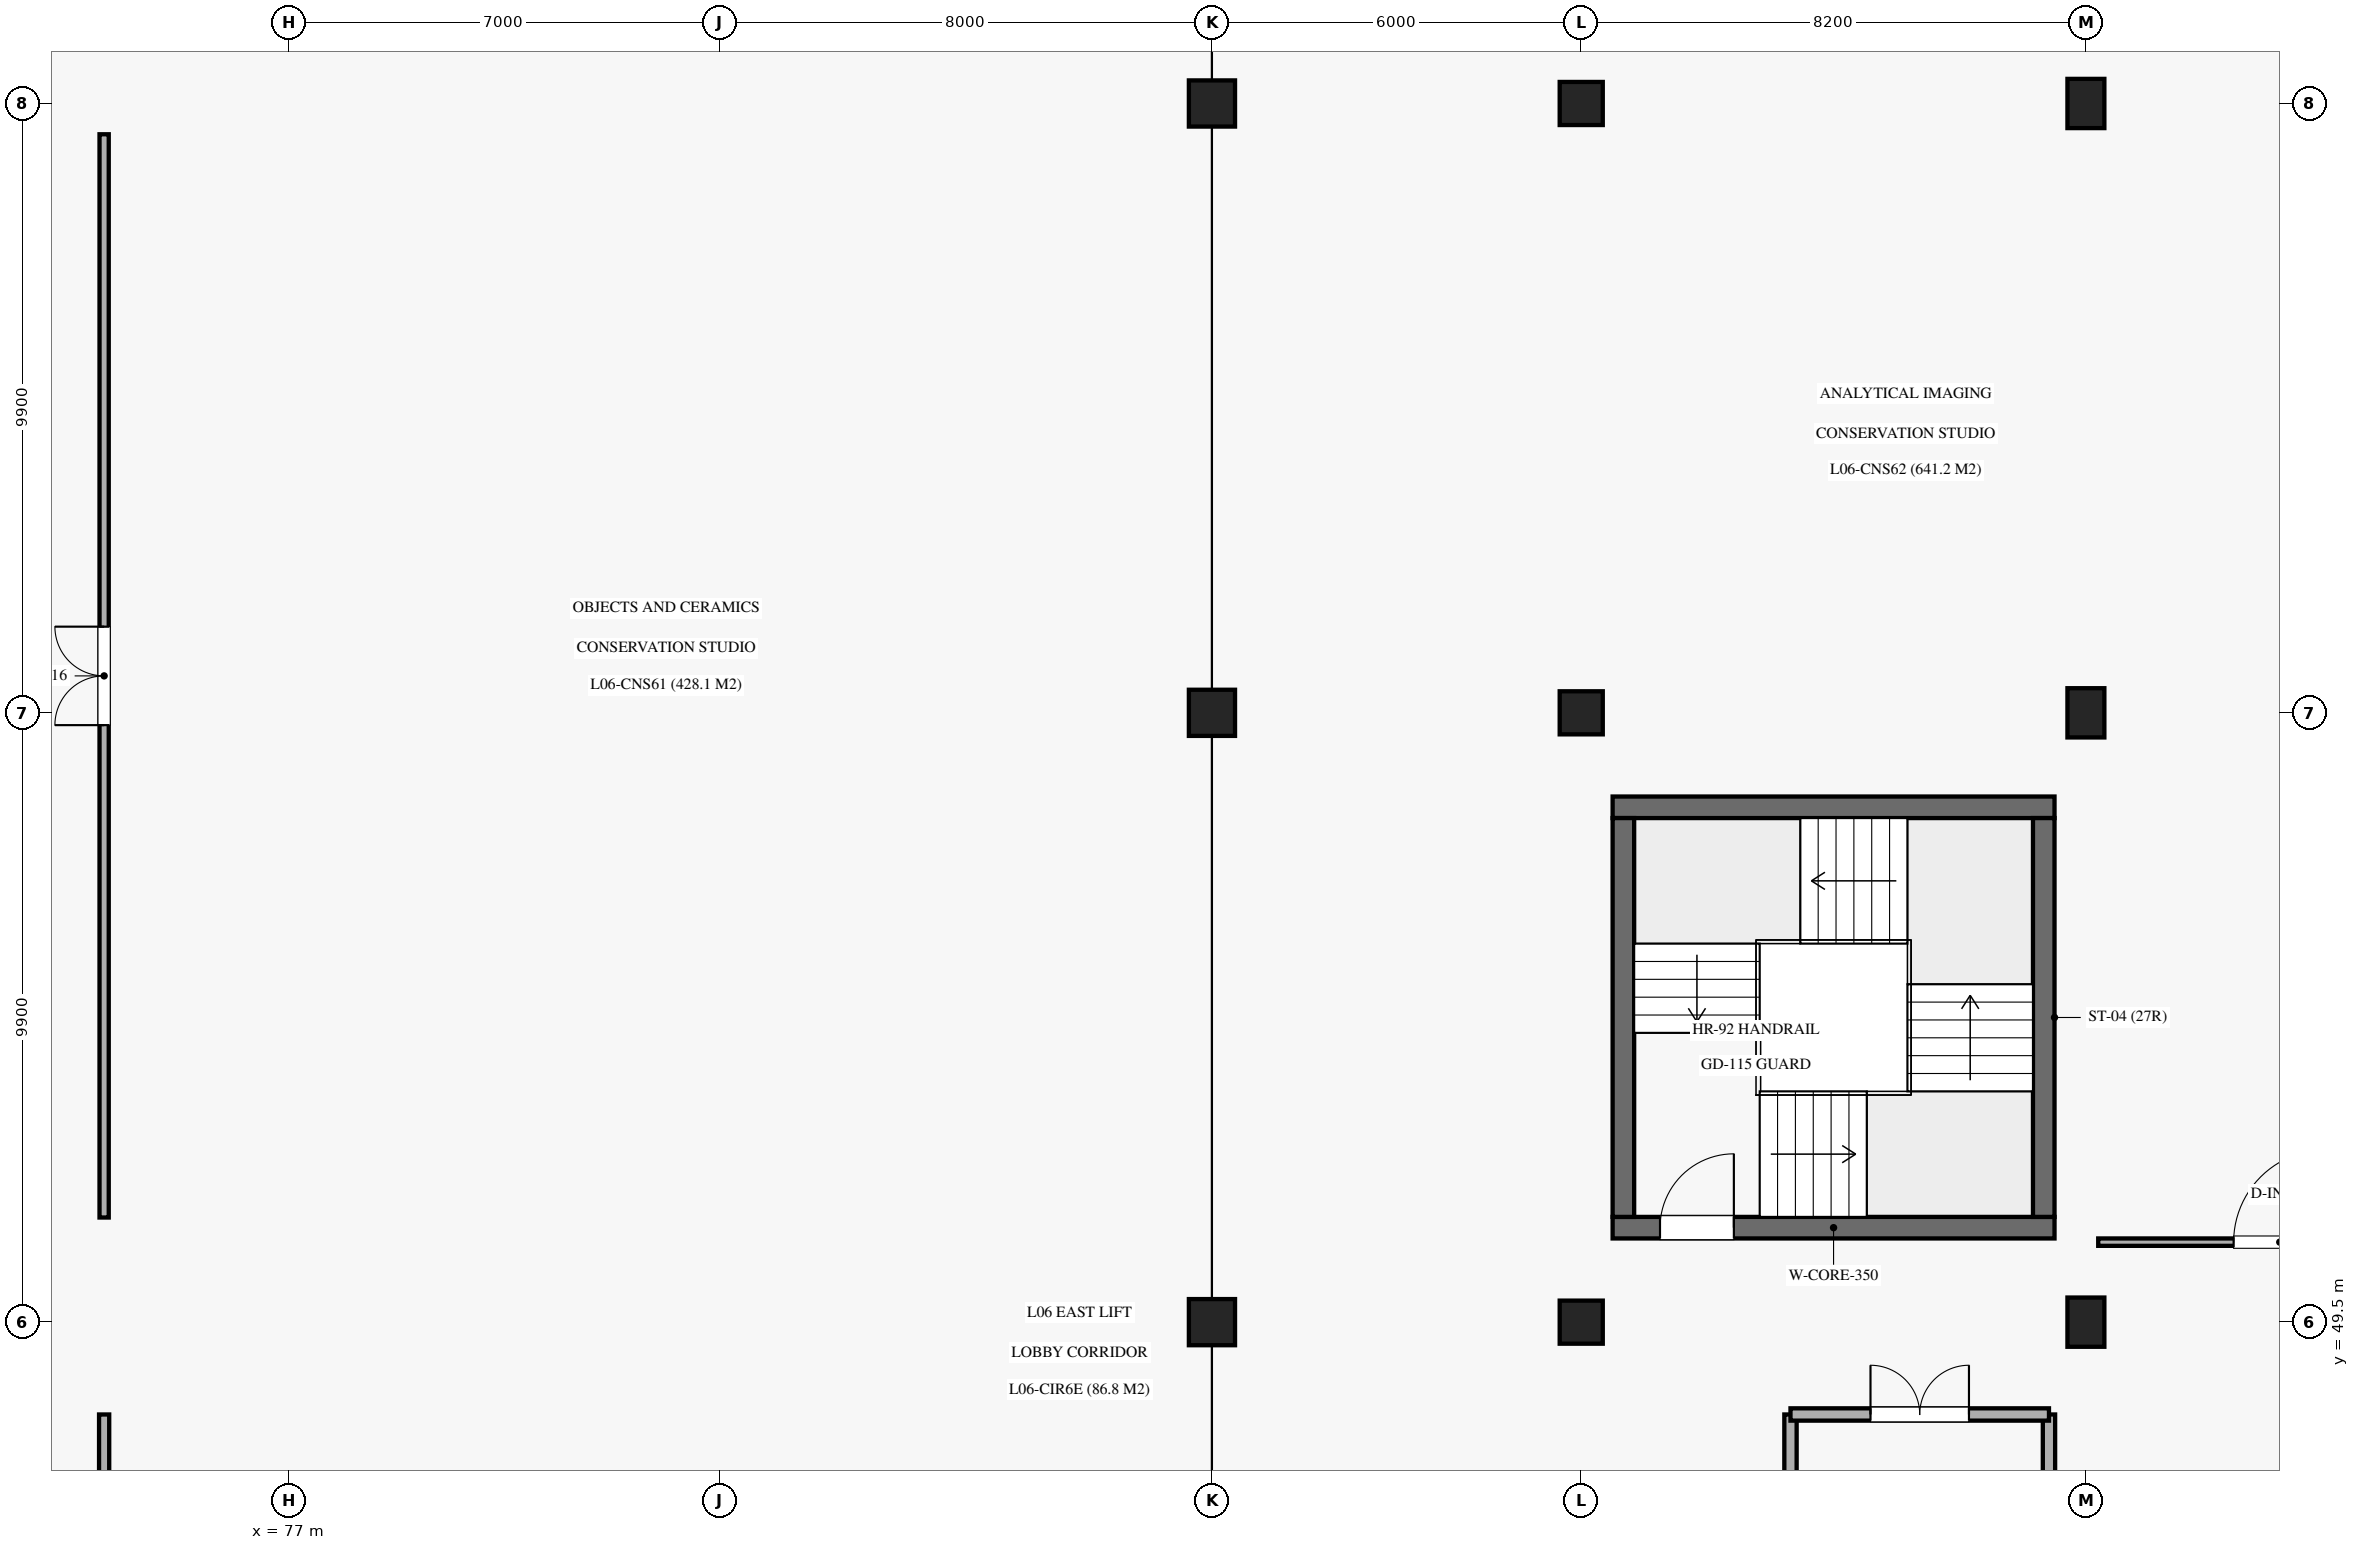
"""IFC4 building model, lengths in metres.
Left out: names, types, materials, properties, quantities, classifications, styles, units other than length and angle.
Written with IfcOpenShell. Run it as: python <this file> out.ifc"""

import sys

from ifc_helpers import new_model, si_unit, direction, frame, frame_2d, origin, origin_2d, place, context, subcontext, project, spatial, rectangle, extrude, element, fill, save


model = new_model("IFC4")
c1 = context("Model", 3, precision=1e-05, world=origin(), true_north=direction((0.0, 1.0)))
c2 = subcontext(c1, "Body", "Model", "MODEL_VIEW")
j1 = project(units=[si_unit("LENGTHUNIT", "METRE"), si_unit("PLANEANGLEUNIT", "RADIAN")], contexts=[c1])
p1 = place(None, origin())
s1 = spatial("IfcSite", under=j1, at=p1, CompositionType="ELEMENT")
p2 = place(p1, origin())
s2 = spatial("IfcBuilding", under=s1, at=p2, CompositionType="ELEMENT")
p3 = place(p2, frame((0.0, 0.0, 33.15)))
s3 = spatial("IfcBuildingStorey", under=s2, at=p3, CompositionType="ELEMENT", Elevation=33.15)
for number, where, z_axis, x_axis in (
    (1, (92.0, 49.5, 0.0), (0.0, 0.0, 1.0), (1.0, 0.0, 0.0)),
    (2, (92.0, 59.4, 0.0), (0.0, 0.0, 1.0), (1.0, 0.0, 0.0)),
    (3, (92.0, 69.3, 0.0), (0.0, 0.0, 1.0), (1.0, 0.0, 0.0)),
):
    element("IfcColumn", number, at=place(p3, frame(where, z_axis=z_axis, x_axis=x_axis)), inside=s3, PredefinedType="COLUMN", context=c2, shape_type="SweptSolid", body=[
        extrude(rectangle(XDim=0.75, YDim=0.75, at=origin_2d()), origin(), (0.0, 0.0, 1.0), 4.59),
    ])
for number, where, z_axis, x_axis in (
    (4, (98.0, 49.5, 0.0), (0.0, 0.0, 1.0), (1.0, 0.0, 0.0)),
    (5, (98.0, 59.4, 0.0), (0.0, 0.0, 1.0), (1.0, 0.0, 0.0)),
    (6, (98.0, 69.3, 0.0), (0.0, 0.0, 1.0), (1.0, 0.0, 0.0)),
):
    element("IfcColumn", number, at=place(p3, frame(where, z_axis=z_axis, x_axis=x_axis)), inside=s3, PredefinedType="COLUMN", context=c2, shape_type="SweptSolid", body=[
        extrude(rectangle(XDim=0.7, YDim=0.7, at=origin_2d()), origin(), (0.0, 0.0, 1.0), 4.59),
    ])
for number, where, z_axis, x_axis in (
    (7, (106.2, 49.5, 0.0), (0.0, 0.0, 1.0), (1.0, 0.0, 0.0)),
    (8, (106.2, 59.4, 0.0), (0.0, 0.0, 1.0), (1.0, 0.0, 0.0)),
    (9, (106.2, 69.3, 0.0), (0.0, 0.0, 1.0), (1.0, 0.0, 0.0)),
):
    element("IfcColumn", number, at=place(p3, frame(where, z_axis=z_axis, x_axis=x_axis)), inside=s3, PredefinedType="COLUMN", context=c2, shape_type="SweptSolid", body=[
        extrude(rectangle(XDim=0.6, YDim=0.8, at=origin_2d()), origin(), (0.0, 0.0, 1.0), 4.59),
    ])
p4 = place(p3, frame((98.51, 51.035, 0.0), z_axis=(0.0, 0.0, 1.0), x_axis=(1.0, 0.0, 0.0)))
e10 = element("IfcWall", 10, at=p4, inside=s3, PredefinedType="SHEAR", context=c2, shape_type="SweptSolid", body=[
    extrude(rectangle(XDim=7.18, YDim=0.35, at=frame_2d((3.59, 0.0))), origin(), (0.0, 0.0, 1.0), 4.35),
])
p5 = place(p4, frame((0.77, 0.0, 0.0)))
e11 = element("IfcOpeningElement", 11, at=p5, cuts=e10, PredefinedType="OPENING", context=c2, shape_type="SweptSolid", body=[
    extrude(rectangle(XDim=1.2, YDim=2.2, at=frame_2d((0.6, 1.1))), frame((0.0, 0.185, 0.0), z_axis=(0.0, -1.0, 0.0), x_axis=(1.0, 0.0, 0.0)), (0.0, 0.0, 1.0), 0.37),
])
p6 = place(p3, frame((98.51, 57.865, 0.0), z_axis=(0.0, 0.0, 1.0), x_axis=(1.0, 0.0, 0.0)))
e12 = element("IfcWall", 12, at=p6, inside=s3, PredefinedType="SHEAR", context=c2, shape_type="SweptSolid", body=[
    extrude(rectangle(XDim=7.18, YDim=0.35, at=frame_2d((3.59, 0.0))), origin(), (0.0, 0.0, 1.0), 4.35),
])
for number, where, z_axis, x_axis in (
    (13, (98.685, 51.21, 0.0), (0.0, 0.0, 1.0), (0.0, 1.0, 0.0)),
    (14, (105.515, 51.21, 0.0), (0.0, 0.0, 1.0), (0.0, 1.0, 0.0)),
):
    element("IfcWall", number, at=place(p3, frame(where, z_axis=z_axis, x_axis=x_axis)), inside=s3, PredefinedType="SHEAR", context=c2, shape_type="SweptSolid", body=[
        extrude(rectangle(XDim=6.48, YDim=0.35, at=frame_2d((3.24, 0.0))), origin(), (0.0, 0.0, 1.0), 4.35),
    ])
p7 = place(p3, frame((101.4, 45.6, 0.0), z_axis=(0.0, 0.0, 1.0), x_axis=(0.0, 1.0, 0.0)))
e15 = element("IfcWall", 15, at=p7, inside=s3, PredefinedType="SOLIDWALL", context=c2, shape_type="SweptSolid", body=[
    extrude(rectangle(XDim=2.4, YDim=0.2, at=frame_2d((1.2, 0.0))), origin(), (0.0, 0.0, 1.0), 3.47),
])
p8 = place(p3, frame((105.6, 40.3, 0.0), z_axis=(0.0, 0.0, 1.0), x_axis=(0.0, 1.0, 0.0)))
e16 = element("IfcWall", 16, at=p8, inside=s3, PredefinedType="SOLIDWALL", context=c2, shape_type="SweptSolid", body=[
    extrude(rectangle(XDim=7.7, YDim=0.2, at=frame_2d((3.85, 0.0))), origin(), (0.0, 0.0, 1.0), 3.47),
])
p9 = place(p3, frame((101.4, 48.0, 0.0), z_axis=(0.0, 0.0, 1.0), x_axis=(1.0, 0.0, 0.0)))
e17 = element("IfcWall", 17, at=p9, inside=s3, PredefinedType="SOLIDWALL", context=c2, shape_type="SweptSolid", body=[
    extrude(rectangle(XDim=4.2, YDim=0.2, at=frame_2d((2.1, 0.0))), origin(), (0.0, 0.0, 1.0), 3.47),
])
p10 = place(p9, frame((1.3, 0.0, 0.0)))
e18 = element("IfcOpeningElement", 18, at=p10, cuts=e17, PredefinedType="OPENING", context=c2, shape_type="SweptSolid", body=[
    extrude(rectangle(XDim=1.6, YDim=2.2, at=frame_2d((0.8, 1.1))), frame((0.0, 0.11, 0.0), z_axis=(0.0, -1.0, 0.0), x_axis=(1.0, 0.0, 0.0)), (0.0, 0.0, 1.0), 0.22),
])
p11 = place(p3, frame((74.0, 40.0, 0.0), z_axis=(0.0, 0.0, 1.0), x_axis=(0.0, 1.0, 0.0)))
e19 = element("IfcWall", 19, at=p11, inside=s3, PredefinedType="PARTITIONING", context=c2, shape_type="SweptSolid", body=[
    extrude(rectangle(XDim=8.0, YDim=0.165, at=frame_2d((4.0, 0.0))), origin(), (0.0, 0.0, 1.0), 3.47),
])
p12 = place(p11, frame((3.0, 0.0, 0.0)))
e20 = element("IfcOpeningElement", 20, at=p12, cuts=e19, PredefinedType="OPENING", context=c2, shape_type="SweptSolid", body=[
    extrude(rectangle(XDim=1.8, YDim=2.45, at=frame_2d((0.9, 1.225))), frame((0.0, 0.093, 0.0), z_axis=(0.0, -1.0, 0.0), x_axis=(1.0, 0.0, 0.0)), (0.0, 0.0, 1.0), 0.185),
])
p13 = place(p3, frame((74.0, 51.2, 0.0), z_axis=(0.0, 0.0, 1.0), x_axis=(0.0, 1.0, 0.0)))
e21 = element("IfcWall", 21, at=p13, inside=s3, PredefinedType="PARTITIONING", context=c2, shape_type="SweptSolid", body=[
    extrude(rectangle(XDim=17.6, YDim=0.15, at=frame_2d((8.8, 0.0))), origin(), (0.0, 0.0, 1.0), 3.47),
])
p14 = place(p13, frame((8.0, 0.0, 0.0)))
e22 = element("IfcOpeningElement", 22, at=p14, cuts=e21, PredefinedType="OPENING", context=c2, shape_type="SweptSolid", body=[
    extrude(rectangle(XDim=1.6, YDim=2.25, at=frame_2d((0.8, 1.125))), frame((0.0, 0.085, 0.0), z_axis=(0.0, -1.0, 0.0), x_axis=(1.0, 0.0, 0.0)), (0.0, 0.0, 1.0), 0.17),
])
p15 = place(p3, frame((106.4, 50.8, 0.0), z_axis=(0.0, 0.0, 1.0), x_axis=(1.0, 0.0, 0.0)))
e23 = element("IfcWall", 23, at=p15, inside=s3, PredefinedType="PARTITIONING", context=c2, shape_type="SweptSolid", body=[
    extrude(rectangle(XDim=7.2, YDim=0.12, at=frame_2d((3.6, 0.0))), origin(), (0.0, 0.0, 1.0), 3.47),
])
p16 = place(p15, frame((2.2, 0.0, 0.0)))
e24 = element("IfcOpeningElement", 24, at=p16, cuts=e23, PredefinedType="OPENING", context=c2, shape_type="SweptSolid", body=[
    extrude(rectangle(XDim=1.5, YDim=2.2, at=frame_2d((0.75, 1.1))), frame((0.0, 0.07, 0.0), z_axis=(0.0, -1.0, 0.0), x_axis=(1.0, 0.0, 0.0)), (0.0, 0.0, 1.0), 0.14),
])
p17 = place(p5, origin())
e25 = element("IfcDoor", 25, at=p17, inside=s3, OperationType="SINGLE_SWING_RIGHT", PredefinedType="DOOR", context=c2, shape_type="SweptSolid", body=[
    extrude(rectangle(XDim=1.2, YDim=2.2, at=frame_2d((0.6, 1.1))), frame((0.0, 0.025, 0.0), z_axis=(0.0, -1.0, 0.0), x_axis=(1.0, 0.0, 0.0)), (0.0, 0.0, 1.0), 0.05),
])
fill(e11, e25)
p18 = place(p10, origin())
e26 = element("IfcDoor", 26, at=p18, inside=s3, OperationType="DOUBLE_DOOR_SINGLE_SWING", PredefinedType="DOOR", context=c2, shape_type="SweptSolid", body=[
    extrude(rectangle(XDim=1.6, YDim=2.2, at=frame_2d((0.8, 1.1))), frame((0.0, 0.025, 0.0), z_axis=(0.0, -1.0, 0.0), x_axis=(1.0, 0.0, 0.0)), (0.0, 0.0, 1.0), 0.05),
])
fill(e18, e26)
p19 = place(p14, origin())
e27 = element("IfcDoor", 27, at=p19, inside=s3, OperationType="DOUBLE_DOOR_SINGLE_SWING", PredefinedType="DOOR", context=c2, shape_type="SweptSolid", body=[
    extrude(rectangle(XDim=1.6, YDim=2.25, at=frame_2d((0.8, 1.125))), frame((0.0, 0.025, 0.0), z_axis=(0.0, -1.0, 0.0), x_axis=(1.0, 0.0, 0.0)), (0.0, 0.0, 1.0), 0.05),
])
fill(e22, e27)
p20 = place(p16, origin())
e28 = element("IfcDoor", 28, at=p20, inside=s3, OperationType="SINGLE_SWING_RIGHT", PredefinedType="DOOR", context=c2, shape_type="SweptSolid", body=[
    extrude(rectangle(XDim=1.5, YDim=2.2, at=frame_2d((0.75, 1.1))), frame((0.0, 0.025, 0.0), z_axis=(0.0, -1.0, 0.0), x_axis=(1.0, 0.0, 0.0)), (0.0, 0.0, 1.0), 0.05),
])
fill(e24, e28)
save(model, sys.argv[1])
